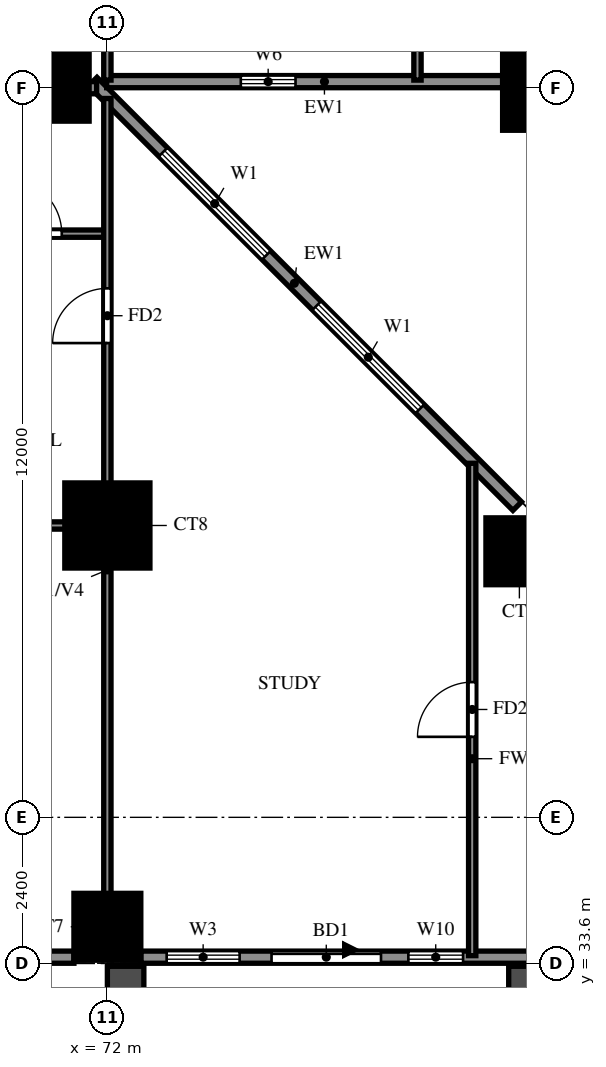
"""IFC4 building model, lengths in metres.
Left out: names, types, materials, properties, quantities, classifications, styles, units other than length and angle.
Written with IfcOpenShell. Run it as: python <this file> out.ifc"""

import sys

from ifc_helpers import new_model, si_unit, direction, frame, frame_2d, origin, origin_2d, place, context, subcontext, project, spatial, rectangle, extrude, source, transform, mapped, element, fill, save


model = new_model("IFC4")
c1 = context("Model", 3, precision=1e-05, world=origin(), true_north=direction((0.0, 1.0)))
c2 = subcontext(c1, "Body", "Model", "MODEL_VIEW")
j1 = project(units=[si_unit("LENGTHUNIT", "METRE"), si_unit("PLANEANGLEUNIT", "RADIAN")], contexts=[c1])
p1 = place(None, origin())
s1 = spatial("IfcSite", under=j1, at=p1, CompositionType="ELEMENT")
p2 = place(p1, origin())
s2 = spatial("IfcBuilding", under=s1, at=p2, CompositionType="ELEMENT")
p3 = place(p2, frame((0.0, 0.0, 55.0)))
s3 = spatial("IfcBuildingStorey", under=s2, at=p3, CompositionType="ELEMENT", Elevation=55.0)
m1 = source(origin(), c2, "Body", "SweptSolid", [
    extrude(rectangle(XDim=1.1, YDim=1.1, at=origin_2d()), origin(), (0.0, 0.0, 1.0), 3.18),
])
for number, where, z_axis, x_axis in (
    (1, (72.0, 34.2, 0.0), (0.0, 0.0, 1.0), (1.0, 0.0, 0.0)),
    (2, (78.776, 40.376, 0.0), (0.0, 0.0, 1.0), (1.0, 0.0, 0.0)),
):
    element("IfcColumn", number, at=place(p3, frame(where, z_axis=z_axis, x_axis=x_axis)), inside=s3, PredefinedType="COLUMN", context=c2, shape_type="MappedRepresentation", body=[
        mapped(m1, transform((0.0, 0.0, 0.0))),
    ])
m2 = source(origin(), c2, "Body", "SweptSolid", [
    extrude(rectangle(XDim=1.4, YDim=1.4, at=origin_2d()), origin(), (0.0, 0.0, 1.0), 3.18),
])
p4 = place(p3, frame((72.0, 40.8, 0.0), z_axis=(0.0, 0.0, 1.0), x_axis=(1.0, 0.0, 0.0)))
e3 = element("IfcColumn", 3, at=p4, inside=s3, PredefinedType="COLUMN", context=c2, shape_type="MappedRepresentation", body=[
    mapped(m2, transform((0.0, 0.0, 0.0))),
])
p5 = place(p3, frame((71.15, 48.0, 0.0), z_axis=(0.0, 0.0, 1.0), x_axis=(1.0, 0.0, 0.0)))
e4 = element("IfcColumn", 4, at=p5, inside=s3, PredefinedType="COLUMN", context=c2, shape_type="MappedRepresentation", body=[
    mapped(m1, transform((0.0, 0.0, 0.0))),
])
p6 = place(p3, frame((79.2, 48.0, 0.0), z_axis=(0.0, 0.0, 1.0), x_axis=(1.0, 0.0, 0.0)))
e5 = element("IfcColumn", 5, at=p6, inside=s3, PredefinedType="COLUMN", context=c2, shape_type="MappedRepresentation", body=[
    mapped(m2, transform((0.0, 0.0, 0.0))),
])
p7 = place(p3, frame((78.74, 41.118, 0.0), z_axis=(0.0, 0.0, 1.0), x_axis=(-0.707106781187, 0.707106781187, 0.0)))
e6 = element("IfcWall", 6, at=p7, inside=s3, PredefinedType="SOLIDWALL", context=c2, shape_type="SweptSolid", body=[
    extrude(rectangle(XDim=9.874, YDim=0.2, at=frame_2d((4.937, 0.0))), origin(), (0.0, 0.0, 1.0), 3.18),
])
p8 = place(p7, frame((2.264, 0.0, 0.6)))
e7 = element("IfcOpeningElement", 7, at=p8, cuts=e6, PredefinedType="OPENING", context=c2, shape_type="SweptSolid", body=[
    extrude(rectangle(XDim=2.4, YDim=2.4, at=frame_2d((1.2, 1.2))), frame((0.0, 0.11, 0.0), z_axis=(0.0, -1.0, 0.0), x_axis=(1.0, 0.0, 0.0)), (0.0, 0.0, 1.0), 0.22),
])
p9 = place(p7, frame((5.836, 0.0, 0.6)))
e8 = element("IfcOpeningElement", 8, at=p9, cuts=e6, PredefinedType="OPENING", context=c2, shape_type="SweptSolid", body=[
    extrude(rectangle(XDim=2.4, YDim=2.4, at=frame_2d((1.2, 1.2))), frame((0.0, 0.11, 0.0), z_axis=(0.0, -1.0, 0.0), x_axis=(1.0, 0.0, 0.0)), (0.0, 0.0, 1.0), 0.22),
])
p10 = place(p3, frame((71.989, 48.1, 0.0), z_axis=(0.0, 0.0, 1.0), x_axis=(1.0, 0.0, 0.0)))
e9 = element("IfcWall", 9, at=p10, inside=s3, PredefinedType="SOLIDWALL", context=c2, shape_type="SweptSolid", body=[
    extrude(rectangle(XDim=6.511, YDim=0.2, at=frame_2d((3.256, 0.0))), origin(), (0.0, 0.0, 1.0), 3.18),
])
p11 = place(p10, frame((2.206, 0.0, 1.5)))
e10 = element("IfcOpeningElement", 10, at=p11, cuts=e9, PredefinedType="OPENING", context=c2, shape_type="SweptSolid", body=[
    extrude(rectangle(XDim=0.9, YDim=0.9, at=frame_2d((0.45, 0.45))), frame((0.0, 0.11, 0.0), z_axis=(0.0, -1.0, 0.0), x_axis=(1.0, 0.0, 0.0)), (0.0, 0.0, 1.0), 0.22),
])
p12 = place(p3, frame((65.35, 33.7, 0.0), z_axis=(0.0, 0.0, 1.0), x_axis=(1.0, 0.0, 0.0)))
e11 = element("IfcWall", 11, at=p12, inside=s3, PredefinedType="SOLIDWALL", context=c2, shape_type="SweptSolid", body=[
    extrude(rectangle(XDim=6.1, YDim=0.2, at=frame_2d((3.05, 0.0))), origin(), (0.0, 0.0, 1.0), 3.18),
])
p13 = place(p12, frame((3.575, 0.0, 0.6)))
e12 = element("IfcOpeningElement", 12, at=p13, cuts=e11, PredefinedType="OPENING", context=c2, shape_type="SweptSolid", body=[
    extrude(rectangle(XDim=1.8, YDim=2.4, at=frame_2d((0.9, 1.2))), frame((0.0, 0.11, 0.0), z_axis=(0.0, -1.0, 0.0), x_axis=(1.0, 0.0, 0.0)), (0.0, 0.0, 1.0), 0.22),
])
p14 = place(p12, frame((0.725, 0.0, 0.6)))
e13 = element("IfcOpeningElement", 13, at=p14, cuts=e11, PredefinedType="OPENING", context=c2, shape_type="SweptSolid", body=[
    extrude(rectangle(XDim=1.8, YDim=2.4, at=frame_2d((0.9, 1.2))), frame((0.0, 0.11, 0.0), z_axis=(0.0, -1.0, 0.0), x_axis=(1.0, 0.0, 0.0)), (0.0, 0.0, 1.0), 0.22),
])
p15 = place(p3, frame((72.55, 33.7, 0.0), z_axis=(0.0, 0.0, 1.0), x_axis=(1.0, 0.0, 0.0)))
e14 = element("IfcWall", 14, at=p15, inside=s3, PredefinedType="SOLIDWALL", context=c2, shape_type="SweptSolid", body=[
    extrude(rectangle(XDim=13.609, YDim=0.2, at=frame_2d((6.804, 0.0))), origin(), (0.0, 0.0, 1.0), 3.18),
])
p16 = place(p15, frame((2.15, 0.0, 0.0)))
e15 = element("IfcOpeningElement", 15, at=p16, cuts=e14, PredefinedType="OPENING", context=c2, shape_type="SweptSolid", body=[
    extrude(rectangle(XDim=1.8, YDim=2.4, at=frame_2d((0.9, 1.2))), frame((0.0, 0.11, 0.0), z_axis=(0.0, -1.0, 0.0), x_axis=(1.0, 0.0, 0.0)), (0.0, 0.0, 1.0), 0.22),
])
p17 = place(p15, frame((0.425, 0.0, 0.6)))
e16 = element("IfcOpeningElement", 16, at=p17, cuts=e14, PredefinedType="OPENING", context=c2, shape_type="SweptSolid", body=[
    extrude(rectangle(XDim=1.2, YDim=2.4, at=frame_2d((0.6, 1.2))), frame((0.0, 0.11, 0.0), z_axis=(0.0, -1.0, 0.0), x_axis=(1.0, 0.0, 0.0)), (0.0, 0.0, 1.0), 0.22),
])
p18 = place(p15, frame((4.4, 0.0, 0.6)))
e17 = element("IfcOpeningElement", 17, at=p18, cuts=e14, PredefinedType="OPENING", context=c2, shape_type="SweptSolid", body=[
    extrude(rectangle(XDim=0.9, YDim=2.4, at=frame_2d((0.45, 1.2))), frame((0.0, 0.11, 0.0), z_axis=(0.0, -1.0, 0.0), x_axis=(1.0, 0.0, 0.0)), (0.0, 0.0, 1.0), 0.22),
])
p19 = place(p15, frame((7.336, 0.0, 0.6)))
e18 = element("IfcOpeningElement", 18, at=p19, cuts=e14, PredefinedType="OPENING", context=c2, shape_type="SweptSolid", body=[
    extrude(rectangle(XDim=2.4, YDim=2.4, at=frame_2d((1.2, 1.2))), frame((0.0, 0.11, 0.0), z_axis=(0.0, -1.0, 0.0), x_axis=(1.0, 0.0, 0.0)), (0.0, 0.0, 1.0), 0.22),
])
p20 = place(p15, frame((10.323, 0.0, 0.6)))
e19 = element("IfcOpeningElement", 19, at=p20, cuts=e14, PredefinedType="OPENING", context=c2, shape_type="SweptSolid", body=[
    extrude(rectangle(XDim=2.4, YDim=2.4, at=frame_2d((1.2, 1.2))), frame((0.0, 0.11, 0.0), z_axis=(0.0, -1.0, 0.0), x_axis=(1.0, 0.0, 0.0)), (0.0, 0.0, 1.0), 0.22),
])
for number, where, z_axis, x_axis in (
    (20, (72.3, 33.55, 0.0), (0.0, 0.0, 1.0), (0.0, -1.0, 0.0)),
    (21, (78.9, 33.55, 0.0), (0.0, 0.0, 1.0), (0.0, -1.0, 0.0)),
):
    element("IfcWall", number, at=place(p3, frame(where, z_axis=z_axis, x_axis=x_axis)), inside=s3, PredefinedType="SOLIDWALL", context=c2, shape_type="SweptSolid", body=[
        extrude(rectangle(XDim=2.65, YDim=0.6, at=frame_2d((1.325, 0.0))), origin(), (0.0, 0.0, 1.0), 2.85),
    ])
p21 = place(p3, frame((67.2, 48.0, 0.0), z_axis=(0.0, 0.0, 1.0), x_axis=(1.0, 0.0, 0.0)))
e22 = element("IfcWall", 22, at=p21, inside=s3, PredefinedType="SOLIDWALL", context=c2, shape_type="SweptSolid", body=[
    extrude(rectangle(XDim=4.623, YDim=0.2, at=frame_2d((2.312, 0.0))), origin(), (0.0, 0.0, 1.0), 3.18),
])
p22 = place(p3, frame((60.0, 40.8, 0.0), z_axis=(0.0, 0.0, 1.0), x_axis=(1.0, 0.0, 0.0)))
e23 = element("IfcWall", 23, at=p22, inside=s3, PredefinedType="PARTITIONING", context=c2, shape_type="SweptSolid", body=[
    extrude(rectangle(XDim=12.0, YDim=0.12, at=frame_2d((6.0, 0.0))), origin(), (0.0, 0.0, 1.0), 3.18),
])
p23 = place(p22, frame((9.75, 0.0, 0.0)))
e24 = element("IfcOpeningElement", 24, at=p23, cuts=e23, PredefinedType="OPENING", context=c2, shape_type="SweptSolid", body=[
    extrude(rectangle(XDim=0.9, YDim=2.1, at=frame_2d((0.45, 1.05))), frame((0.0, 0.07, 0.0), z_axis=(0.0, -1.0, 0.0), x_axis=(1.0, 0.0, 0.0)), (0.0, 0.0, 1.0), 0.14),
])
p24 = place(p22, frame((2.55, 0.0, 0.0)))
e25 = element("IfcOpeningElement", 25, at=p24, cuts=e23, PredefinedType="OPENING", context=c2, shape_type="SweptSolid", body=[
    extrude(rectangle(XDim=1.5, YDim=2.1, at=frame_2d((0.75, 1.05))), frame((0.0, 0.07, 0.0), z_axis=(0.0, -1.0, 0.0), x_axis=(1.0, 0.0, 0.0)), (0.0, 0.0, 1.0), 0.14),
])
p25 = place(p3, frame((67.2, 45.6, 0.0), z_axis=(0.0, 0.0, 1.0), x_axis=(1.0, 0.0, 0.0)))
e26 = element("IfcWall", 26, at=p25, inside=s3, PredefinedType="PARTITIONING", context=c2, shape_type="SweptSolid", body=[
    extrude(rectangle(XDim=4.8, YDim=0.12, at=frame_2d((2.4, 0.0))), origin(), (0.0, 0.0, 1.0), 3.18),
])
p26 = place(p25, frame((3.15, 0.0, 0.0)))
e27 = element("IfcOpeningElement", 27, at=p26, cuts=e26, PredefinedType="OPENING", context=c2, shape_type="SweptSolid", body=[
    extrude(rectangle(XDim=0.9, YDim=2.1, at=frame_2d((0.45, 1.05))), frame((0.0, 0.07, 0.0), z_axis=(0.0, -1.0, 0.0), x_axis=(1.0, 0.0, 0.0)), (0.0, 0.0, 1.0), 0.14),
])
p27 = place(p3, frame((72.0, 33.725, 0.0), z_axis=(0.0, 0.0, 1.0), x_axis=(0.0, 1.0, 0.0)))
e28 = element("IfcWall", 28, at=p27, inside=s3, PredefinedType="PARTITIONING", context=c2, shape_type="SweptSolid", body=[
    extrude(rectangle(XDim=14.098, YDim=0.12, at=frame_2d((7.049, 0.0))), origin(), (0.0, 0.0, 1.0), 2.28),
])
p28 = place(p27, frame((10.075, 0.0, 0.0)))
e29 = element("IfcOpeningElement", 29, at=p28, cuts=e28, PredefinedType="OPENING", context=c2, shape_type="SweptSolid", body=[
    extrude(rectangle(XDim=0.9, YDim=2.1, at=frame_2d((0.45, 1.05))), frame((0.0, 0.07, 0.0), z_axis=(0.0, -1.0, 0.0), x_axis=(1.0, 0.0, 0.0)), (0.0, 0.0, 1.0), 0.14),
])
for number, where, z_axis, x_axis in (
    (30, (72.0, 48.125, 0.0), (0.0, 0.0, 1.0), (0.0, 1.0, 0.0)),
    (31, (77.1, 48.125, 0.0), (0.0, 0.0, 1.0), (0.0, 1.0, 0.0)),
):
    element("IfcWall", number, at=place(p3, frame(where, z_axis=z_axis, x_axis=x_axis)), inside=s3, PredefinedType="PARTITIONING", context=c2, shape_type="SweptSolid", body=[
        extrude(rectangle(XDim=3.475, YDim=0.12, at=frame_2d((1.738, 0.0))), origin(), (0.0, 0.0, 1.0), 3.18),
    ])
p29 = place(p3, frame((78.0, 33.725, 0.0), z_axis=(0.0, 0.0, 1.0), x_axis=(0.0, 1.0, 0.0)))
e32 = element("IfcWall", 32, at=p29, inside=s3, PredefinedType="PARTITIONING", context=c2, shape_type="SweptSolid", body=[
    extrude(rectangle(XDim=8.098, YDim=0.12, at=frame_2d((4.049, 0.0))), origin(), (0.0, 0.0, 1.0), 2.28),
])
p30 = place(p29, frame((3.599, 0.0, 0.0)))
e33 = element("IfcOpeningElement", 33, at=p30, cuts=e32, PredefinedType="OPENING", context=c2, shape_type="SweptSolid", body=[
    extrude(rectangle(XDim=0.9, YDim=2.1, at=frame_2d((0.45, 1.05))), frame((0.0, 0.07, 0.0), z_axis=(0.0, -1.0, 0.0), x_axis=(1.0, 0.0, 0.0)), (0.0, 0.0, 1.0), 0.14),
])
p31 = place(p8, origin())
e34 = element("IfcWindow", 34, at=p31, inside=s3, PartitioningType="DOUBLE_PANEL_VERTICAL", PredefinedType="WINDOW", context=c2, shape_type="SweptSolid", body=[
    extrude(rectangle(XDim=2.4, YDim=2.4, at=frame_2d((1.2, 1.2))), frame((0.0, 0.03, 0.0), z_axis=(0.0, -1.0, 0.0), x_axis=(1.0, 0.0, 0.0)), (0.0, 0.0, 1.0), 0.06),
])
fill(e7, e34)
p32 = place(p9, origin())
e35 = element("IfcWindow", 35, at=p32, inside=s3, PartitioningType="DOUBLE_PANEL_VERTICAL", PredefinedType="WINDOW", context=c2, shape_type="SweptSolid", body=[
    extrude(rectangle(XDim=2.4, YDim=2.4, at=frame_2d((1.2, 1.2))), frame((0.0, 0.03, 0.0), z_axis=(0.0, -1.0, 0.0), x_axis=(1.0, 0.0, 0.0)), (0.0, 0.0, 1.0), 0.06),
])
fill(e8, e35)
p33 = place(p11, origin())
e36 = element("IfcWindow", 36, at=p33, inside=s3, PartitioningType="SINGLE_PANEL", PredefinedType="WINDOW", context=c2, shape_type="SweptSolid", body=[
    extrude(rectangle(XDim=0.9, YDim=0.9, at=frame_2d((0.45, 0.45))), frame((0.0, 0.03, 0.0), z_axis=(0.0, -1.0, 0.0), x_axis=(1.0, 0.0, 0.0)), (0.0, 0.0, 1.0), 0.06),
])
fill(e10, e36)
p34 = place(p16, origin())
e37 = element("IfcDoor", 37, at=p34, inside=s3, OperationType="DOUBLE_DOOR_SLIDING", PredefinedType="DOOR", context=c2, shape_type="SweptSolid", body=[
    extrude(rectangle(XDim=1.8, YDim=2.4, at=frame_2d((0.9, 1.2))), frame((0.0, 0.025, 0.0), z_axis=(0.0, -1.0, 0.0), x_axis=(1.0, 0.0, 0.0)), (0.0, 0.0, 1.0), 0.05),
])
fill(e15, e37)
p35 = place(p17, origin())
e38 = element("IfcWindow", 38, at=p35, inside=s3, PartitioningType="SINGLE_PANEL", PredefinedType="WINDOW", context=c2, shape_type="SweptSolid", body=[
    extrude(rectangle(XDim=1.2, YDim=2.4, at=frame_2d((0.6, 1.2))), frame((0.0, 0.03, 0.0), z_axis=(0.0, -1.0, 0.0), x_axis=(1.0, 0.0, 0.0)), (0.0, 0.0, 1.0), 0.06),
])
fill(e16, e38)
p36 = place(p18, origin())
e39 = element("IfcWindow", 39, at=p36, inside=s3, PartitioningType="SINGLE_PANEL", PredefinedType="WINDOW", context=c2, shape_type="SweptSolid", body=[
    extrude(rectangle(XDim=0.9, YDim=2.4, at=frame_2d((0.45, 1.2))), frame((0.0, 0.03, 0.0), z_axis=(0.0, -1.0, 0.0), x_axis=(1.0, 0.0, 0.0)), (0.0, 0.0, 1.0), 0.06),
])
fill(e17, e39)
p37 = place(p26, origin())
e40 = element("IfcDoor", 40, at=p37, inside=s3, OperationType="SINGLE_SWING_LEFT", PredefinedType="DOOR", context=c2, shape_type="SweptSolid", body=[
    extrude(rectangle(XDim=0.9, YDim=2.1, at=frame_2d((0.45, 1.05))), frame((0.0, 0.025, 0.0), z_axis=(0.0, -1.0, 0.0), x_axis=(1.0, 0.0, 0.0)), (0.0, 0.0, 1.0), 0.05),
])
fill(e27, e40)
p38 = place(p28, origin())
e41 = element("IfcDoor", 41, at=p38, inside=s3, OperationType="SINGLE_SWING_RIGHT", PredefinedType="DOOR", context=c2, shape_type="SweptSolid", body=[
    extrude(rectangle(XDim=0.9, YDim=2.1, at=frame_2d((0.45, 1.05))), frame((0.0, 0.025, 0.0), z_axis=(0.0, -1.0, 0.0), x_axis=(1.0, 0.0, 0.0)), (0.0, 0.0, 1.0), 0.05),
])
fill(e29, e41)
p39 = place(p30, origin())
e42 = element("IfcDoor", 42, at=p39, inside=s3, OperationType="SINGLE_SWING_LEFT", PredefinedType="DOOR", context=c2, shape_type="SweptSolid", body=[
    extrude(rectangle(XDim=0.9, YDim=2.1, at=frame_2d((0.45, 1.05))), frame((0.0, 0.025, 0.0), z_axis=(0.0, -1.0, 0.0), x_axis=(1.0, 0.0, 0.0)), (0.0, 0.0, 1.0), 0.05),
])
fill(e33, e42)
save(model, sys.argv[1])
